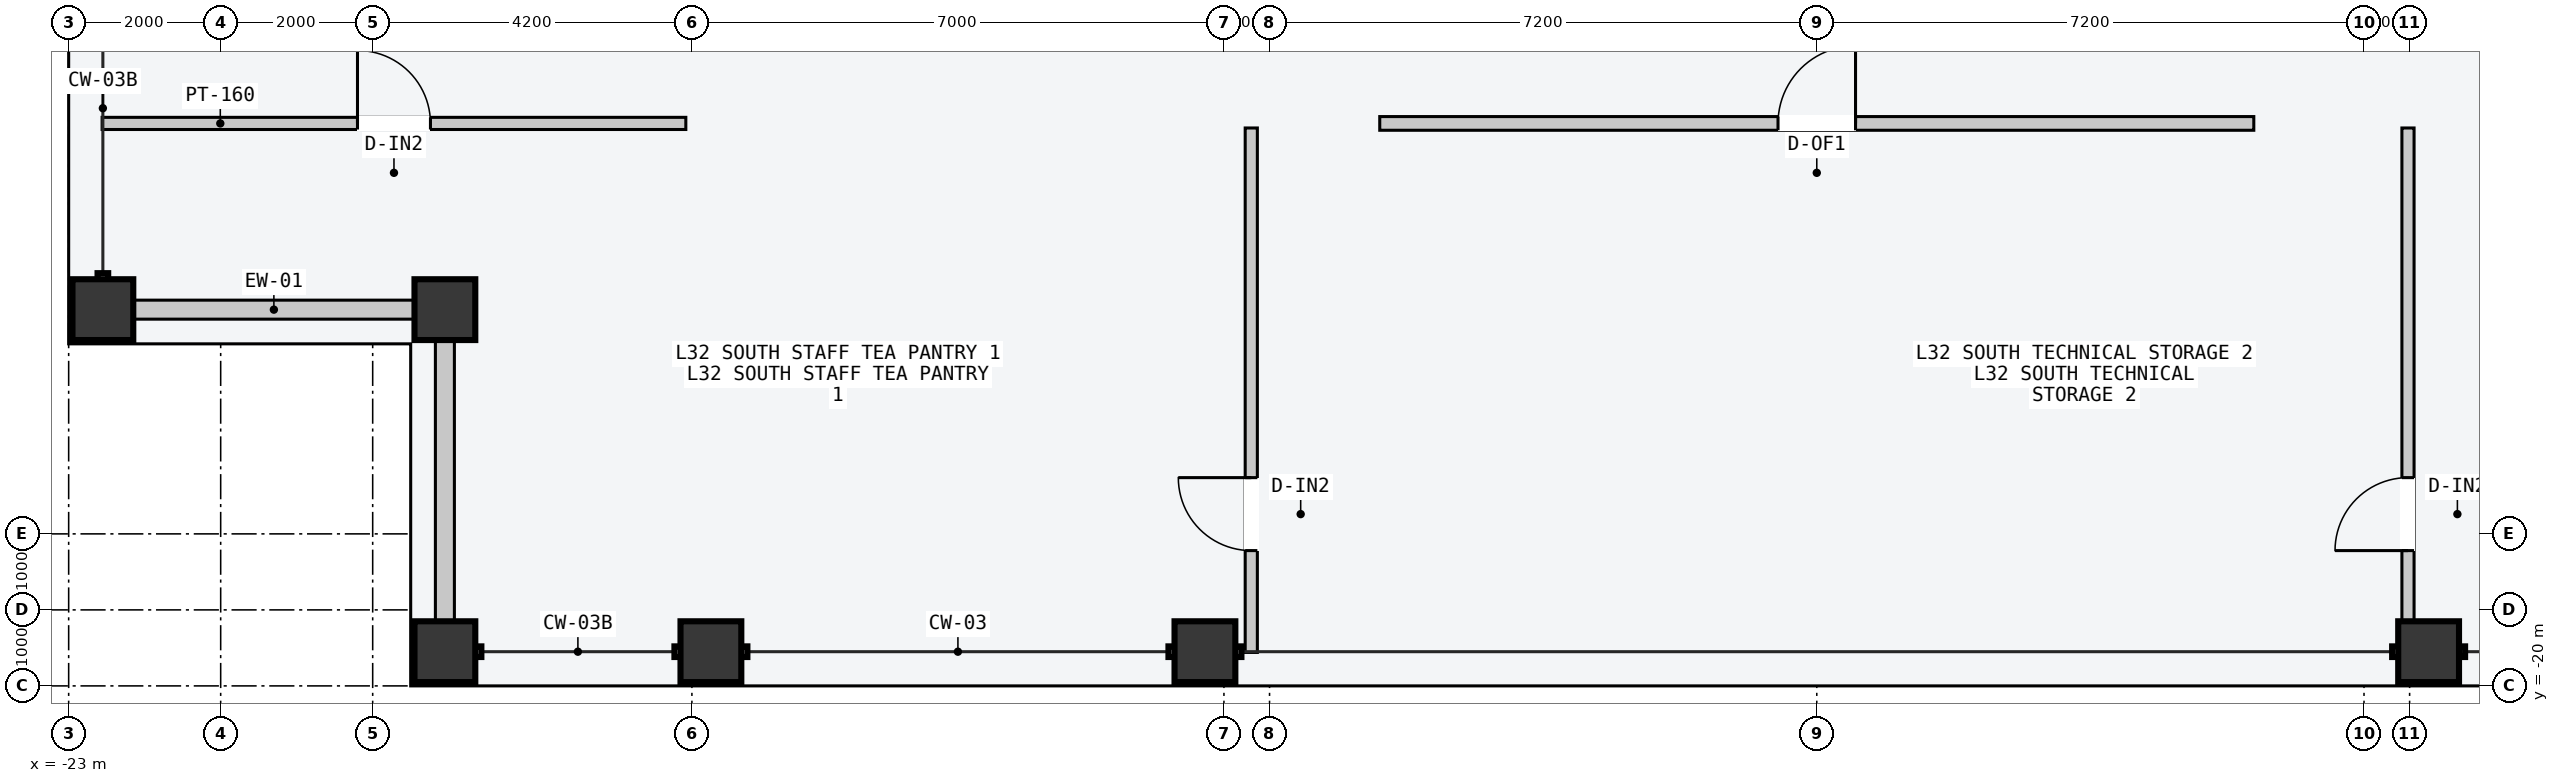
"""IFC4 building model, lengths in metres.
Left out: names, types, materials, properties, quantities, classifications, styles, units other than length and angle.
Written with IfcOpenShell. Run it as: python <this file> out.ifc"""

import sys

from ifc_helpers import new_model, si_unit, direction, frame, frame_2d, origin, origin_2d, place, context, subcontext, project, spatial, rectangle, hollow_rectangle, extrude, element, fill, save


model = new_model("IFC4")
c1 = context("Model", 3, precision=1e-05, world=origin(), true_north=direction((0.0, 1.0)))
c2 = subcontext(c1, "Body", "Model", "MODEL_VIEW")
j1 = project(units=[si_unit("LENGTHUNIT", "METRE"), si_unit("PLANEANGLEUNIT", "RADIAN")], contexts=[c1])
p1 = place(None, origin())
s1 = spatial("IfcSite", under=j1, at=p1, CompositionType="ELEMENT")
p2 = place(p1, origin())
s2 = spatial("IfcBuilding", under=s1, at=p2, CompositionType="ELEMENT")
p3 = place(p2, frame((0.0, 0.0, 124.2)))
s3 = spatial("IfcBuildingStorey", under=s2, at=p3, CompositionType="ELEMENT", Elevation=124.2)
for number, where, z_axis, x_axis in (
    (1, (-18.05, -19.55, 0.0), (0.0, 0.0, 1.0), (1.0, 0.0, 0.0)),
    (2, (-14.55, -19.55, 0.0), (0.0, 0.0, 1.0), (1.0, 0.0, 0.0)),
    (3, (-8.05, -19.55, 0.0), (0.0, 0.0, 1.0), (1.0, 0.0, 0.0)),
    (4, (8.05, -19.55, 0.0), (0.0, 0.0, 1.0), (1.0, 0.0, 0.0)),
    (5, (-22.55, -15.05, 0.0), (0.0, 0.0, 1.0), (0.0, 1.0, 0.0)),
    (6, (-18.05, -15.05, 0.0), (0.0, 0.0, 1.0), (1.0, 0.0, 0.0)),
):
    element("IfcColumn", number, at=place(p3, frame(where, z_axis=z_axis, x_axis=x_axis)), inside=s3, PredefinedType="COLUMN", context=c2, shape_type="SweptSolid", body=[
        extrude(hollow_rectangle(XDim=0.8, YDim=0.8, WallThickness=0.036, at=origin_2d()), origin(), (0.0, 0.0, 1.0), 3.6),
    ])
for number, where, z_axis, x_axis in (
    (7, (-22.14, -15.05, 0.0), (0.0, 0.0, 1.0), (1.0, 0.0, 0.0)),
    (8, (-18.05, -19.14, 0.0), (0.0, 0.0, 1.0), (0.0, 1.0, 0.0)),
):
    element("IfcWall", number, at=place(p3, frame(where, z_axis=z_axis, x_axis=x_axis)), inside=s3, PredefinedType="STANDARD", context=c2, shape_type="SweptSolid", body=[
        extrude(rectangle(XDim=3.68, YDim=0.25, at=frame_2d((1.84, 0.0))), origin(), (0.0, 0.0, 1.0), 2.75),
    ])
p4 = place(p3, frame((-7.44, -19.56, 0.0), z_axis=(0.0, 0.0, 1.0), x_axis=(0.0, 1.0, 0.0)))
e9 = element("IfcWall", 9, at=p4, inside=s3, PredefinedType="PARTITIONING", context=c2, shape_type="SweptSolid", body=[
    extrude(rectangle(XDim=6.9, YDim=0.16, at=frame_2d((3.45, 0.0))), origin(), (0.0, 0.0, 1.0), 3.4),
])
p5 = place(p4, frame((1.34, 0.0, 0.0)))
e10 = element("IfcOpeningElement", 10, at=p5, cuts=e9, PredefinedType="OPENING", context=c2, shape_type="SweptSolid", body=[
    extrude(rectangle(XDim=0.96, YDim=2.18, at=frame_2d((0.48, 1.09))), frame((0.0, 0.09, 0.0), z_axis=(0.0, -1.0, 0.0), x_axis=(1.0, 0.0, 0.0)), (0.0, 0.0, 1.0), 0.18),
])
p6 = place(p3, frame((7.779, -19.56, 0.0), z_axis=(0.0, 0.0, 1.0), x_axis=(0.0, 1.0, 0.0)))
e11 = element("IfcWall", 11, at=p6, inside=s3, PredefinedType="PARTITIONING", context=c2, shape_type="SweptSolid", body=[
    extrude(rectangle(XDim=6.9, YDim=0.16, at=frame_2d((3.45, 0.0))), origin(), (0.0, 0.0, 1.0), 3.4),
])
p7 = place(p6, frame((1.34, 0.0, 0.0)))
e12 = element("IfcOpeningElement", 12, at=p7, cuts=e11, PredefinedType="OPENING", context=c2, shape_type="SweptSolid", body=[
    extrude(rectangle(XDim=0.96, YDim=2.18, at=frame_2d((0.48, 1.09))), frame((0.0, 0.09, 0.0), z_axis=(0.0, -1.0, 0.0), x_axis=(1.0, 0.0, 0.0)), (0.0, 0.0, 1.0), 0.18),
])
p8 = place(p3, frame((-5.75, -12.6, 0.0), z_axis=(0.0, 0.0, 1.0), x_axis=(1.0, 0.0, 0.0)))
e13 = element("IfcWall", 13, at=p8, inside=s3, PredefinedType="PARTITIONING", context=c2, shape_type="SweptSolid", body=[
    extrude(rectangle(XDim=11.5, YDim=0.18, at=frame_2d((5.75, 0.0))), origin(), (0.0, 0.0, 1.0), 3.4),
])
p9 = place(p8, frame((5.24, 0.0, 0.0)))
e14 = element("IfcOpeningElement", 14, at=p9, cuts=e13, PredefinedType="OPENING", context=c2, shape_type="SweptSolid", body=[
    extrude(rectangle(XDim=1.02, YDim=2.2, at=frame_2d((0.51, 1.1))), frame((0.0, 0.1, 0.0), z_axis=(0.0, -1.0, 0.0), x_axis=(1.0, 0.0, 0.0)), (0.0, 0.0, 1.0), 0.2),
])
p10 = place(p3, frame((-22.56, -12.6, 0.0), z_axis=(0.0, 0.0, 1.0), x_axis=(1.0, 0.0, 0.0)))
e15 = element("IfcWall", 15, at=p10, inside=s3, PredefinedType="PARTITIONING", context=c2, shape_type="SweptSolid", body=[
    extrude(rectangle(XDim=7.68, YDim=0.16, at=frame_2d((3.84, 0.0))), origin(), (0.0, 0.0, 1.0), 3.4),
])
p11 = place(p10, frame((3.36, 0.0, 0.0)))
e16 = element("IfcOpeningElement", 16, at=p11, cuts=e15, PredefinedType="OPENING", context=c2, shape_type="SweptSolid", body=[
    extrude(rectangle(XDim=0.96, YDim=2.18, at=frame_2d((0.48, 1.09))), frame((0.0, 0.09, 0.0), z_axis=(0.0, -1.0, 0.0), x_axis=(1.0, 0.0, 0.0)), (0.0, 0.0, 1.0), 0.18),
])
p12 = place(p5, origin())
e17 = element("IfcDoor", 17, at=p12, inside=s3, OperationType="SINGLE_SWING_RIGHT", PredefinedType="DOOR", context=c2, shape_type="SweptSolid", body=[
    extrude(rectangle(XDim=0.96, YDim=2.18, at=frame_2d((0.48, 1.09))), frame((0.0, 0.025, 0.0), z_axis=(0.0, -1.0, 0.0), x_axis=(1.0, 0.0, 0.0)), (0.0, 0.0, 1.0), 0.05),
])
fill(e10, e17)
p13 = place(p7, origin())
e18 = element("IfcDoor", 18, at=p13, inside=s3, OperationType="SINGLE_SWING_LEFT", PredefinedType="DOOR", context=c2, shape_type="SweptSolid", body=[
    extrude(rectangle(XDim=0.96, YDim=2.18, at=frame_2d((0.48, 1.09))), frame((0.0, 0.025, 0.0), z_axis=(0.0, -1.0, 0.0), x_axis=(1.0, 0.0, 0.0)), (0.0, 0.0, 1.0), 0.05),
])
fill(e12, e18)
p14 = place(p9, origin())
e19 = element("IfcDoor", 19, at=p14, inside=s3, OperationType="SINGLE_SWING_RIGHT", PredefinedType="DOOR", context=c2, shape_type="SweptSolid", body=[
    extrude(rectangle(XDim=1.02, YDim=2.2, at=frame_2d((0.51, 1.1))), frame((0.0, 0.025, 0.0), z_axis=(0.0, -1.0, 0.0), x_axis=(1.0, 0.0, 0.0)), (0.0, 0.0, 1.0), 0.05),
])
fill(e14, e19)
p15 = place(p11, origin())
e20 = element("IfcDoor", 20, at=p15, inside=s3, OperationType="SINGLE_SWING_LEFT", PredefinedType="DOOR", context=c2, shape_type="SweptSolid", body=[
    extrude(rectangle(XDim=0.96, YDim=2.18, at=frame_2d((0.48, 1.09))), frame((0.0, 0.025, 0.0), z_axis=(0.0, -1.0, 0.0), x_axis=(1.0, 0.0, 0.0)), (0.0, 0.0, 1.0), 0.05),
])
fill(e16, e20)
save(model, sys.argv[1])
